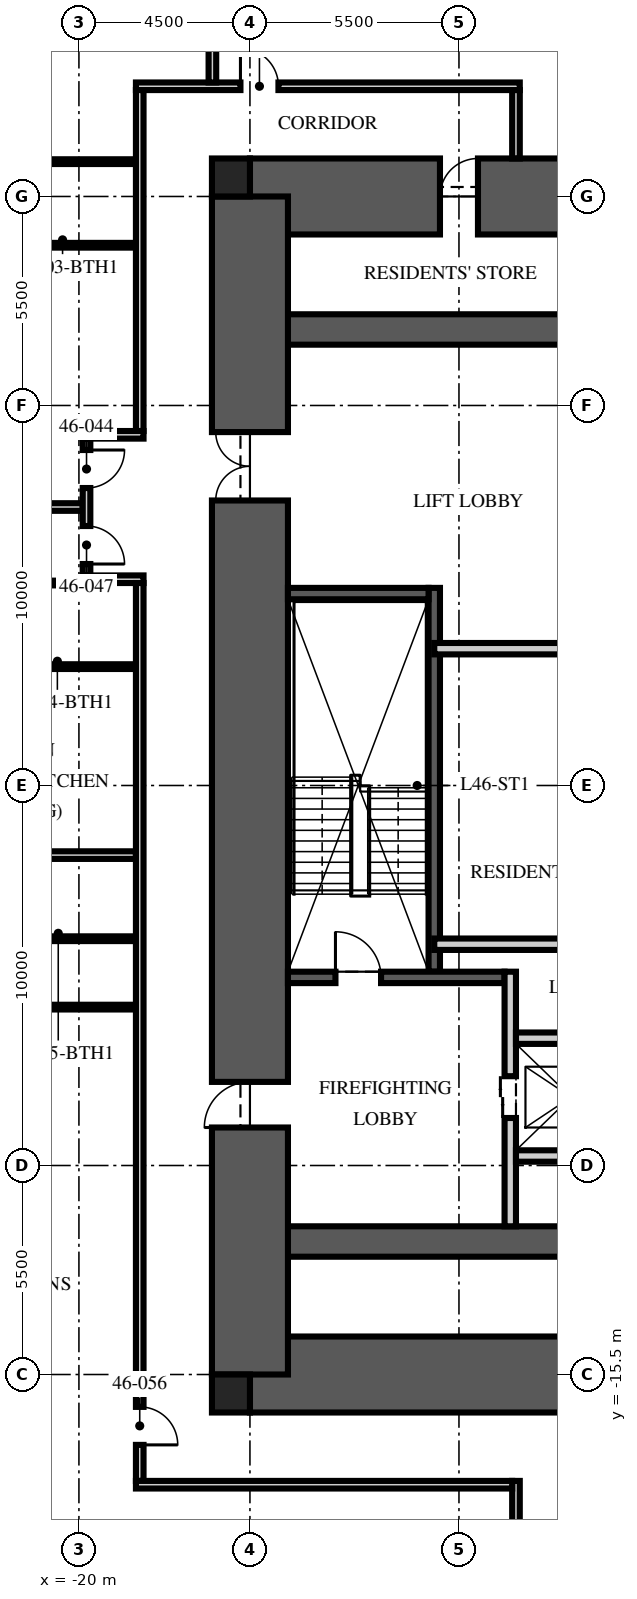
"""IFC4 building model, lengths in metres.
Left out: names, types, materials, properties, quantities, classifications, styles, units other than length and angle.
Written with IfcOpenShell. Run it as: python <this file> out.ifc"""

import sys

from ifc_helpers import new_model, si_unit, direction, frame, frame_2d, origin, origin_2d, place, context, subcontext, project, spatial, rectangle, extrude, element, fill, save


model = new_model("IFC4")
c1 = context("Model", 3, precision=1e-05, world=origin(), true_north=direction((0.0, 1.0)))
c2 = subcontext(c1, "Body", "Model", "MODEL_VIEW")
j1 = project(units=[si_unit("LENGTHUNIT", "METRE"), si_unit("PLANEANGLEUNIT", "RADIAN")], contexts=[c1])
p1 = place(None, origin())
s1 = spatial("IfcSite", under=j1, at=p1, CompositionType="ELEMENT")
p2 = place(p1, origin())
s2 = spatial("IfcBuilding", under=s1, at=p2, CompositionType="ELEMENT")
p3 = place(p2, frame((0.0, 0.0, 182.25)))
s3 = spatial("IfcBuildingStorey", under=s2, at=p3, CompositionType="ELEMENT", Elevation=182.25)
p4 = place(p3, frame((-15.5, 15.5, -0.25), z_axis=(0.0, 0.0, 1.0), x_axis=(1.0, 0.0, 0.0)))
e1 = element("IfcWall", 1, at=p4, inside=s3, PredefinedType="SHEAR", context=c2, shape_type="SweptSolid", body=[
    extrude(rectangle(XDim=31.0, YDim=2.0, at=frame_2d((15.5, 0.0))), origin(), (0.0, 0.0, 1.0), 3.7),
])
p5 = place(p4, frame((5.0, 0.0, 0.25)))
e2 = element("IfcOpeningElement", 2, at=p5, cuts=e1, PredefinedType="OPENING", context=c2, shape_type="SweptSolid", body=[
    extrude(rectangle(XDim=1.0, YDim=2.1, at=frame_2d((0.5, 1.05))), frame((0.0, 1.01, 0.0), z_axis=(0.0, -1.0, 0.0), x_axis=(1.0, 0.0, 0.0)), (0.0, 0.0, 1.0), 2.02),
])
p6 = place(p3, frame((-15.5, -15.5, -0.25), z_axis=(0.0, 0.0, 1.0), x_axis=(1.0, 0.0, 0.0)))
e3 = element("IfcWall", 3, at=p6, inside=s3, PredefinedType="SHEAR", context=c2, shape_type="SweptSolid", body=[
    extrude(rectangle(XDim=31.0, YDim=2.0, at=frame_2d((15.5, 0.0))), origin(), (0.0, 0.0, 1.0), 3.7),
])
p7 = place(p6, frame((10.4, 0.0, 0.25)))
e4 = element("IfcOpeningElement", 4, at=p7, cuts=e3, PredefinedType="OPENING", context=c2, shape_type="SweptSolid", body=[
    extrude(rectangle(XDim=1.1, YDim=2.1, at=frame_2d((0.55, 1.05))), frame((0.0, 1.01, 0.0), z_axis=(0.0, -1.0, 0.0), x_axis=(1.0, 0.0, 0.0)), (0.0, 0.0, 1.0), 2.02),
])
p8 = place(p6, frame((13.5, 0.0, 0.25)))
e5 = element("IfcOpeningElement", 5, at=p8, cuts=e3, PredefinedType="OPENING", context=c2, shape_type="SweptSolid", body=[
    extrude(rectangle(XDim=1.1, YDim=2.1, at=frame_2d((0.55, 1.05))), frame((0.0, 1.01, 0.0), z_axis=(0.0, -1.0, 0.0), x_axis=(1.0, 0.0, 0.0)), (0.0, 0.0, 1.0), 2.02),
])
p9 = place(p6, frame((16.6, 0.0, 0.25)))
e6 = element("IfcOpeningElement", 6, at=p9, cuts=e3, PredefinedType="OPENING", context=c2, shape_type="SweptSolid", body=[
    extrude(rectangle(XDim=1.1, YDim=2.1, at=frame_2d((0.55, 1.05))), frame((0.0, 1.01, 0.0), z_axis=(0.0, -1.0, 0.0), x_axis=(1.0, 0.0, 0.0)), (0.0, 0.0, 1.0), 2.02),
])
for number, where, z_axis, x_axis in (
    (7, (-15.5, 12.0, -0.25), (0.0, 0.0, 1.0), (1.0, 0.0, 0.0)),
    (8, (-15.5, -12.0, -0.25), (0.0, 0.0, 1.0), (1.0, 0.0, 0.0)),
):
    element("IfcWall", number, at=place(p3, frame(where, z_axis=z_axis, x_axis=x_axis)), inside=s3, PredefinedType="SHEAR", context=c2, shape_type="SweptSolid", body=[
        extrude(rectangle(XDim=31.0, YDim=0.8, at=frame_2d((15.5, 0.0))), origin(), (0.0, 0.0, 1.0), 3.7),
    ])
p10 = place(p3, frame((-15.5, -15.5, -0.25), z_axis=(0.0, 0.0, 1.0), x_axis=(0.0, 1.0, 0.0)))
e9 = element("IfcWall", 9, at=p10, inside=s3, PredefinedType="SHEAR", context=c2, shape_type="SweptSolid", body=[
    extrude(rectangle(XDim=31.0, YDim=2.0, at=frame_2d((15.5, 0.0))), origin(), (0.0, 0.0, 1.0), 3.7),
])
p11 = place(p10, frame((6.5, 0.0, 0.25)))
e10 = element("IfcOpeningElement", 10, at=p11, cuts=e9, PredefinedType="OPENING", context=c2, shape_type="SweptSolid", body=[
    extrude(rectangle(XDim=1.2, YDim=2.1, at=frame_2d((0.6, 1.05))), frame((0.0, 1.01, 0.0), z_axis=(0.0, -1.0, 0.0), x_axis=(1.0, 0.0, 0.0)), (0.0, 0.0, 1.0), 2.02),
])
p12 = place(p10, frame((23.0, 0.0, 0.25)))
e11 = element("IfcOpeningElement", 11, at=p12, cuts=e9, PredefinedType="OPENING", context=c2, shape_type="SweptSolid", body=[
    extrude(rectangle(XDim=1.8, YDim=2.1, at=frame_2d((0.9, 1.05))), frame((0.0, 1.01, 0.0), z_axis=(0.0, -1.0, 0.0), x_axis=(1.0, 0.0, 0.0)), (0.0, 0.0, 1.0), 2.02),
])
for number, where, z_axis, x_axis in (
    (12, (-16.0, 16.0, -0.25), (0.0, 0.0, 1.0), (1.0, 0.0, 0.0)),
    (13, (-16.0, -16.0, -0.25), (0.0, 0.0, 1.0), (1.0, 0.0, 0.0)),
):
    element("IfcColumn", number, at=place(p3, frame(where, z_axis=z_axis, x_axis=x_axis)), inside=s3, PredefinedType="COLUMN", context=c2, shape_type="SweptSolid", body=[
        extrude(rectangle(XDim=1.0, YDim=1.0, at=origin_2d()), origin(), (0.0, 0.0, 1.0), 3.7),
    ])
p13 = place(p3, frame((-10.65, -4.9, 0.0), z_axis=(0.0, 0.0, 1.0), x_axis=(0.0, 1.0, 0.0)))
e14 = element("IfcWall", 14, at=p13, inside=s3, PredefinedType="SOLIDWALL", context=c2, shape_type="SweptSolid", body=[
    extrude(rectangle(XDim=10.1, YDim=0.3, at=frame_2d((5.05, 0.0))), origin(), (0.0, 0.0, 1.0), 3.45),
])
p14 = place(p3, frame((-14.5, -5.05, 0.0), z_axis=(0.0, 0.0, 1.0), x_axis=(1.0, 0.0, 0.0)))
e15 = element("IfcWall", 15, at=p14, inside=s3, PredefinedType="SOLIDWALL", context=c2, shape_type="SweptSolid", body=[
    extrude(rectangle(XDim=5.7, YDim=0.3, at=frame_2d((2.85, 0.0))), origin(), (0.0, 0.0, 1.0), 3.45),
])
p15 = place(p14, frame((1.25, 0.0, 0.0)))
e16 = element("IfcOpeningElement", 16, at=p15, cuts=e15, PredefinedType="OPENING", context=c2, shape_type="SweptSolid", body=[
    extrude(rectangle(XDim=1.2, YDim=2.1, at=frame_2d((0.6, 1.05))), frame((0.0, 0.16, 0.0), z_axis=(0.0, -1.0, 0.0), x_axis=(1.0, 0.0, 0.0)), (0.0, 0.0, 1.0), 0.32),
])
p16 = place(p3, frame((-14.5, 5.05, 0.0), z_axis=(0.0, 0.0, 1.0), x_axis=(1.0, 0.0, 0.0)))
e17 = element("IfcWall", 17, at=p16, inside=s3, PredefinedType="SOLIDWALL", context=c2, shape_type="SweptSolid", body=[
    extrude(rectangle(XDim=3.7, YDim=0.3, at=frame_2d((1.85, 0.0))), origin(), (0.0, 0.0, 1.0), 3.45),
])
p17 = place(p3, frame((-8.65, -11.6, 0.0), z_axis=(0.0, 0.0, 1.0), x_axis=(0.0, 1.0, 0.0)))
e18 = element("IfcWall", 18, at=p17, inside=s3, PredefinedType="PARTITIONING", context=c2, shape_type="SweptSolid", body=[
    extrude(rectangle(XDim=6.7, YDim=0.3, at=frame_2d((3.35, 0.0))), origin(), (0.0, 0.0, 1.0), 3.45),
])
p18 = place(p17, frame((2.85, 0.0, 0.0)))
e19 = element("IfcOpeningElement", 19, at=p18, cuts=e18, PredefinedType="OPENING", context=c2, shape_type="SweptSolid", body=[
    extrude(rectangle(XDim=1.1, YDim=2.1, at=frame_2d((0.55, 1.05))), frame((0.0, 0.16, 0.0), z_axis=(0.0, -1.0, 0.0), x_axis=(1.0, 0.0, 0.0)), (0.0, 0.0, 1.0), 0.32),
])
p19 = place(p3, frame((-8.5, -6.65, 0.0), z_axis=(0.0, 0.0, 1.0), x_axis=(1.0, 0.0, 0.0)))
e20 = element("IfcWall", 20, at=p19, inside=s3, PredefinedType="PARTITIONING", context=c2, shape_type="SweptSolid", body=[
    extrude(rectangle(XDim=17.0, YDim=0.3, at=frame_2d((8.5, 0.0))), origin(), (0.0, 0.0, 1.0), 3.45),
])
p20 = place(p19, frame((7.8, 0.0, 0.0)))
e21 = element("IfcOpeningElement", 21, at=p20, cuts=e20, PredefinedType="OPENING", context=c2, shape_type="SweptSolid", body=[
    extrude(rectangle(XDim=1.3, YDim=2.4, at=frame_2d((0.65, 1.2))), frame((0.0, 0.16, 0.0), z_axis=(0.0, -1.0, 0.0), x_axis=(1.0, 0.0, 0.0)), (0.0, 0.0, 1.0), 0.32),
])
p21 = place(p19, frame((5.65, 0.0, 0.0)))
e22 = element("IfcOpeningElement", 22, at=p21, cuts=e20, PredefinedType="OPENING", context=c2, shape_type="SweptSolid", body=[
    extrude(rectangle(XDim=0.9, YDim=2.1, at=frame_2d((0.45, 1.05))), frame((0.0, 0.16, 0.0), z_axis=(0.0, -1.0, 0.0), x_axis=(1.0, 0.0, 0.0)), (0.0, 0.0, 1.0), 0.32),
])
p22 = place(p19, frame((10.4, 0.0, 0.0)))
e23 = element("IfcOpeningElement", 23, at=p22, cuts=e20, PredefinedType="OPENING", context=c2, shape_type="SweptSolid", body=[
    extrude(rectangle(XDim=0.9, YDim=2.1, at=frame_2d((0.45, 1.05))), frame((0.0, 0.16, 0.0), z_axis=(0.0, -1.0, 0.0), x_axis=(1.0, 0.0, 0.0)), (0.0, 0.0, 1.0), 0.32),
])
p23 = place(p3, frame((-8.5, -9.75, 0.0), z_axis=(0.0, 0.0, 1.0), x_axis=(1.0, 0.0, 0.0)))
e24 = element("IfcWall", 24, at=p23, inside=s3, PredefinedType="PARTITIONING", context=c2, shape_type="SweptSolid", body=[
    extrude(rectangle(XDim=2.9, YDim=0.3, at=frame_2d((1.45, 0.0))), origin(), (0.0, 0.0, 1.0), 3.45),
])
p24 = place(p3, frame((-10.65, 3.6, 0.0), z_axis=(0.0, 0.0, 1.0), x_axis=(1.0, 0.0, 0.0)))
e25 = element("IfcWall", 25, at=p24, inside=s3, PredefinedType="PARTITIONING", context=c2, shape_type="SweptSolid", body=[
    extrude(rectangle(XDim=21.3, YDim=0.3, at=frame_2d((10.65, 0.0))), origin(), (0.0, 0.0, 1.0), 3.45),
])
p25 = place(p24, frame((10.05, 0.0, 0.0)))
e26 = element("IfcOpeningElement", 26, at=p25, cuts=e25, PredefinedType="OPENING", context=c2, shape_type="SweptSolid", body=[
    extrude(rectangle(XDim=1.2, YDim=2.1, at=frame_2d((0.6, 1.05))), frame((0.0, 0.16, 0.0), z_axis=(0.0, -1.0, 0.0), x_axis=(1.0, 0.0, 0.0)), (0.0, 0.0, 1.0), 0.32),
])
p26 = place(p24, frame((19.238, 0.0, 0.0)))
e27 = element("IfcOpeningElement", 27, at=p26, cuts=e25, PredefinedType="OPENING", context=c2, shape_type="SweptSolid", body=[
    extrude(rectangle(XDim=0.9, YDim=2.1, at=frame_2d((0.45, 1.05))), frame((0.0, 0.16, 0.0), z_axis=(0.0, -1.0, 0.0), x_axis=(1.0, 0.0, 0.0)), (0.0, 0.0, 1.0), 0.32),
])
p27 = place(p3, frame((-10.65, -4.177, 0.0), z_axis=(0.0, 0.0, 1.0), x_axis=(1.0, 0.0, 0.0)))
e28 = element("IfcWall", 28, at=p27, inside=s3, PredefinedType="PARTITIONING", context=c2, shape_type="SweptSolid", body=[
    extrude(rectangle(XDim=6.45, YDim=0.3, at=frame_2d((3.225, 0.0))), origin(), (0.0, 0.0, 1.0), 3.45),
])
p28 = place(p3, frame((-18.5, 18.4, 0.0), z_axis=(0.0, 0.0, 1.0), x_axis=(1.0, 0.0, 0.0)))
e29 = element("IfcWall", 29, at=p28, inside=s3, PredefinedType="PARTITIONING", context=c2, shape_type="SweptSolid", body=[
    extrude(rectangle(XDim=10.1, YDim=0.2, at=frame_2d((5.05, 0.0))), origin(), (0.0, 0.0, 1.0), 2.25),
])
p29 = place(p28, frame((2.75, 0.0, 0.0)))
e30 = element("IfcOpeningElement", 30, at=p29, cuts=e29, PredefinedType="OPENING", context=c2, shape_type="SweptSolid", body=[
    extrude(rectangle(XDim=1.0, YDim=2.2, at=frame_2d((0.5, 1.1))), frame((0.0, 0.11, 0.0), z_axis=(0.0, -1.0, 0.0), x_axis=(1.0, 0.0, 0.0)), (0.0, 0.0, 1.0), 0.22),
])
p30 = place(p3, frame((-8.5, 18.3, 0.0), z_axis=(0.0, 0.0, 1.0), x_axis=(0.0, -1.0, 0.0)))
e31 = element("IfcWall", 31, at=p30, inside=s3, PredefinedType="PARTITIONING", context=c2, shape_type="SweptSolid", body=[
    extrude(rectangle(XDim=1.8, YDim=0.2, at=frame_2d((0.9, 0.0))), origin(), (0.0, 0.0, 1.0), 3.45),
])
p31 = place(p3, frame((-16.488, 18.5, 0.0), z_axis=(0.0, 0.0, 1.0), x_axis=(0.0, 1.0, 0.0)))
e32 = element("IfcWall", 32, at=p31, inside=s3, PredefinedType="PARTITIONING", context=c2, shape_type="SweptSolid", body=[
    extrude(rectangle(XDim=9.65, YDim=0.2, at=frame_2d((4.825, 0.0))), origin(), (0.0, 0.0, 1.0), 2.56),
])
p32 = place(p3, frame((-19.9, 7.328, 0.0), z_axis=(0.0, 0.0, 1.0), x_axis=(-1.0, 0.0, 0.0)))
e33 = element("IfcWall", 33, at=p32, inside=s3, PredefinedType="PARTITIONING", context=c2, shape_type="SweptSolid", body=[
    extrude(rectangle(XDim=8.25, YDim=0.2, at=frame_2d((4.125, 0.0))), origin(), (0.0, 0.0, 1.0), 2.56),
])
p33 = place(p3, frame((-18.5, -1.832, 0.0), z_axis=(0.0, 0.0, 1.0), x_axis=(-1.0, 0.0, 0.0)))
e34 = element("IfcWall", 34, at=p33, inside=s3, PredefinedType="PARTITIONING", context=c2, shape_type="SweptSolid", body=[
    extrude(rectangle(XDim=9.65, YDim=0.2, at=frame_2d((4.825, 0.0))), origin(), (0.0, 0.0, 1.0), 2.56),
])
for number, where, z_axis, x_axis in (
    (35, (-18.5, 16.417, 0.0), (0.0, 0.0, 1.0), (-1.0, 0.0, 0.0)),
    (36, (-18.5, 14.217, 0.0), (0.0, 0.0, 1.0), (-1.0, 0.0, 0.0)),
):
    element("IfcWall", number, at=place(p3, frame(where, z_axis=z_axis, x_axis=x_axis)), inside=s3, PredefinedType="PARTITIONING", context=c2, shape_type="SweptSolid", body=[
        extrude(rectangle(XDim=3.53, YDim=0.125, at=frame_2d((1.765, 0.0))), origin(), (0.0, 0.0, 1.0), 3.45),
    ])
p34 = place(p3, frame((-19.97, 5.328, 0.0), z_axis=(0.0, 0.0, 1.0), x_axis=(-1.0, 0.0, 0.0)))
e37 = element("IfcWall", 37, at=p34, inside=s3, PredefinedType="PARTITIONING", context=c2, shape_type="SweptSolid", body=[
    extrude(rectangle(XDim=2.06, YDim=0.125, at=frame_2d((1.03, 0.0))), origin(), (0.0, 0.0, 1.0), 3.45),
])
for number, where, z_axis, x_axis in (
    (38, (-18.5, 3.128, 0.0), (0.0, 0.0, 1.0), (-1.0, 0.0, 0.0)),
    (39, (-18.5, -4.032, 0.0), (0.0, 0.0, 1.0), (-1.0, 0.0, 0.0)),
    (40, (-18.5, -5.832, 0.0), (0.0, 0.0, 1.0), (-1.0, 0.0, 0.0)),
):
    element("IfcWall", number, at=place(p3, frame(where, z_axis=z_axis, x_axis=x_axis)), inside=s3, PredefinedType="PARTITIONING", context=c2, shape_type="SweptSolid", body=[
        extrude(rectangle(XDim=3.53, YDim=0.125, at=frame_2d((1.765, 0.0))), origin(), (0.0, 0.0, 1.0), 3.45),
    ])
p35 = place(p3, frame((-18.4, 18.3, 0.0), z_axis=(0.0, 0.0, 1.0), x_axis=(0.0, -1.0, 0.0)))
e41 = element("IfcWall", 41, at=p35, inside=s3, PredefinedType="PARTITIONING", context=c2, shape_type="SweptSolid", body=[
    extrude(rectangle(XDim=8.972, YDim=0.2, at=frame_2d((4.486, 0.0))), origin(), (0.0, 0.0, 1.0), 2.25),
])
p36 = place(p3, frame((-18.3, 9.228, 0.0), z_axis=(0.0, 0.0, 1.0), x_axis=(-1.0, 0.0, 0.0)))
e42 = element("IfcWall", 42, at=p36, inside=s3, PredefinedType="PARTITIONING", context=c2, shape_type="SweptSolid", body=[
    extrude(rectangle(XDim=1.6, YDim=0.2, at=frame_2d((0.8, 0.0))), origin(), (0.0, 0.0, 1.0), 2.45),
])
p37 = place(p3, frame((-18.3, 5.428, 0.0), z_axis=(0.0, 0.0, 1.0), x_axis=(-1.0, 0.0, 0.0)))
e43 = element("IfcWall", 43, at=p37, inside=s3, PredefinedType="PARTITIONING", context=c2, shape_type="SweptSolid", body=[
    extrude(rectangle(XDim=1.6, YDim=0.2, at=frame_2d((0.8, 0.0))), origin(), (0.0, 0.0, 1.0), 3.45),
])
p38 = place(p3, frame((-19.8, 9.128, 0.0), z_axis=(0.0, 0.0, 1.0), x_axis=(0.0, -1.0, 0.0)))
e44 = element("IfcWall", 44, at=p38, inside=s3, PredefinedType="PARTITIONING", context=c2, shape_type="SweptSolid", body=[
    extrude(rectangle(XDim=3.6, YDim=0.2, at=frame_2d((1.8, 0.0))), origin(), (0.0, 0.0, 1.0), 2.45),
])
p39 = place(p38, frame((0.3, 0.0, 0.0)))
e45 = element("IfcOpeningElement", 45, at=p39, cuts=e44, PredefinedType="OPENING", context=c2, shape_type="SweptSolid", body=[
    extrude(rectangle(XDim=1.0, YDim=2.2, at=frame_2d((0.5, 1.1))), frame((0.0, 0.11, 0.0), z_axis=(0.0, -1.0, 0.0), x_axis=(1.0, 0.0, 0.0)), (0.0, 0.0, 1.0), 0.22),
])
p40 = place(p38, frame((2.3, 0.0, 0.0)))
e46 = element("IfcOpeningElement", 46, at=p40, cuts=e44, PredefinedType="OPENING", context=c2, shape_type="SweptSolid", body=[
    extrude(rectangle(XDim=1.0, YDim=2.2, at=frame_2d((0.5, 1.1))), frame((0.0, 0.11, 0.0), z_axis=(0.0, -1.0, 0.0), x_axis=(1.0, 0.0, 0.0)), (0.0, 0.0, 1.0), 0.22),
])
p41 = place(p3, frame((-18.4, 5.328, 0.0), z_axis=(0.0, 0.0, 1.0), x_axis=(0.0, -1.0, 0.0)))
e47 = element("IfcWall", 47, at=p41, inside=s3, PredefinedType="PARTITIONING", context=c2, shape_type="SweptSolid", body=[
    extrude(rectangle(XDim=23.628, YDim=0.2, at=frame_2d((11.814, 0.0))), origin(), (0.0, 0.0, 1.0), 2.25),
])
p42 = place(p41, frame((21.68, 0.0, 0.0)))
e48 = element("IfcOpeningElement", 48, at=p42, cuts=e47, PredefinedType="OPENING", context=c2, shape_type="SweptSolid", body=[
    extrude(rectangle(XDim=1.0, YDim=2.2, at=frame_2d((0.5, 1.1))), frame((0.0, 0.11, 0.0), z_axis=(0.0, -1.0, 0.0), x_axis=(1.0, 0.0, 0.0)), (0.0, 0.0, 1.0), 0.22),
])
p43 = place(p3, frame((-8.5, -18.3, 0.0), z_axis=(0.0, 0.0, 1.0), x_axis=(0.0, -1.0, 0.0)))
e49 = element("IfcWall", 49, at=p43, inside=s3, PredefinedType="PARTITIONING", context=c2, shape_type="SweptSolid", body=[
    extrude(rectangle(XDim=3.0, YDim=0.2, at=frame_2d((1.5, 0.0))), origin(), (0.0, 0.0, 1.0), 3.45),
])
p44 = place(p3, frame((-8.6, -18.4, 0.0), z_axis=(0.0, 0.0, 1.0), x_axis=(-1.0, 0.0, 0.0)))
e50 = element("IfcWall", 50, at=p44, inside=s3, PredefinedType="PARTITIONING", context=c2, shape_type="SweptSolid", body=[
    extrude(rectangle(XDim=9.9, YDim=0.2, at=frame_2d((4.95, 0.0))), origin(), (0.0, 0.0, 1.0), 2.25),
])
p45 = place(p15, origin())
e51 = element("IfcDoor", 51, at=p45, inside=s3, OperationType="SINGLE_SWING_LEFT", PredefinedType="DOOR", context=c2, shape_type="SweptSolid", body=[
    extrude(rectangle(XDim=1.2, YDim=2.1, at=frame_2d((0.6, 1.05))), frame((0.0, 0.025, 0.0), z_axis=(0.0, -1.0, 0.0), x_axis=(1.0, 0.0, 0.0)), (0.0, 0.0, 1.0), 0.05),
])
fill(e16, e51)
p46 = place(p11, origin())
e52 = element("IfcDoor", 52, at=p46, inside=s3, OperationType="SINGLE_SWING_LEFT", PredefinedType="DOOR", context=c2, shape_type="SweptSolid", body=[
    extrude(rectangle(XDim=1.2, YDim=2.1, at=frame_2d((0.6, 1.05))), frame((0.0, 0.025, 0.0), z_axis=(0.0, -1.0, 0.0), x_axis=(1.0, 0.0, 0.0)), (0.0, 0.0, 1.0), 0.05),
])
fill(e10, e52)
p47 = place(p12, origin())
e53 = element("IfcDoor", 53, at=p47, inside=s3, OperationType="DOUBLE_DOOR_SINGLE_SWING", PredefinedType="DOOR", context=c2, shape_type="SweptSolid", body=[
    extrude(rectangle(XDim=1.8, YDim=2.1, at=frame_2d((0.9, 1.05))), frame((0.0, 0.025, 0.0), z_axis=(0.0, -1.0, 0.0), x_axis=(1.0, 0.0, 0.0)), (0.0, 0.0, 1.0), 0.05),
])
fill(e11, e53)
p48 = place(p18, origin())
e54 = element("IfcDoor", 54, at=p48, inside=s3, OperationType="DOUBLE_DOOR_SLIDING", PredefinedType="DOOR", context=c2, shape_type="SweptSolid", body=[
    extrude(rectangle(XDim=1.1, YDim=2.1, at=frame_2d((0.55, 1.05))), frame((0.0, 0.025, 0.0), z_axis=(0.0, -1.0, 0.0), x_axis=(1.0, 0.0, 0.0)), (0.0, 0.0, 1.0), 0.05),
])
fill(e19, e54)
p49 = place(p5, origin())
e55 = element("IfcDoor", 55, at=p49, inside=s3, OperationType="SINGLE_SWING_RIGHT", PredefinedType="DOOR", context=c2, shape_type="SweptSolid", body=[
    extrude(rectangle(XDim=1.0, YDim=2.1, at=frame_2d((0.5, 1.05))), frame((0.0, 0.025, 0.0), z_axis=(0.0, -1.0, 0.0), x_axis=(1.0, 0.0, 0.0)), (0.0, 0.0, 1.0), 0.05),
])
fill(e2, e55)
p50 = place(p29, origin())
e56 = element("IfcDoor", 56, at=p50, inside=s3, OperationType="SINGLE_SWING_LEFT", PredefinedType="DOOR", context=c2, shape_type="SweptSolid", body=[
    extrude(rectangle(XDim=1.0, YDim=2.2, at=frame_2d((0.5, 1.1))), frame((0.0, 0.025, 0.0), z_axis=(0.0, -1.0, 0.0), x_axis=(1.0, 0.0, 0.0)), (0.0, 0.0, 1.0), 0.05),
])
fill(e30, e56)
p51 = place(p39, origin())
e57 = element("IfcDoor", 57, at=p51, inside=s3, OperationType="SINGLE_SWING_LEFT", PredefinedType="DOOR", context=c2, shape_type="SweptSolid", body=[
    extrude(rectangle(XDim=1.0, YDim=2.2, at=frame_2d((0.5, 1.1))), frame((0.0, 0.025, 0.0), z_axis=(0.0, -1.0, 0.0), x_axis=(1.0, 0.0, 0.0)), (0.0, 0.0, 1.0), 0.05),
])
fill(e45, e57)
p52 = place(p40, origin())
e58 = element("IfcDoor", 58, at=p52, inside=s3, OperationType="SINGLE_SWING_RIGHT", PredefinedType="DOOR", context=c2, shape_type="SweptSolid", body=[
    extrude(rectangle(XDim=1.0, YDim=2.2, at=frame_2d((0.5, 1.1))), frame((0.0, 0.025, 0.0), z_axis=(0.0, -1.0, 0.0), x_axis=(1.0, 0.0, 0.0)), (0.0, 0.0, 1.0), 0.05),
])
fill(e46, e58)
p53 = place(p42, origin())
e59 = element("IfcDoor", 59, at=p53, inside=s3, OperationType="SINGLE_SWING_RIGHT", PredefinedType="DOOR", context=c2, shape_type="SweptSolid", body=[
    extrude(rectangle(XDim=1.0, YDim=2.2, at=frame_2d((0.5, 1.1))), frame((0.0, 0.025, 0.0), z_axis=(0.0, -1.0, 0.0), x_axis=(1.0, 0.0, 0.0)), (0.0, 0.0, 1.0), 0.05),
])
fill(e48, e59)
save(model, sys.argv[1])
